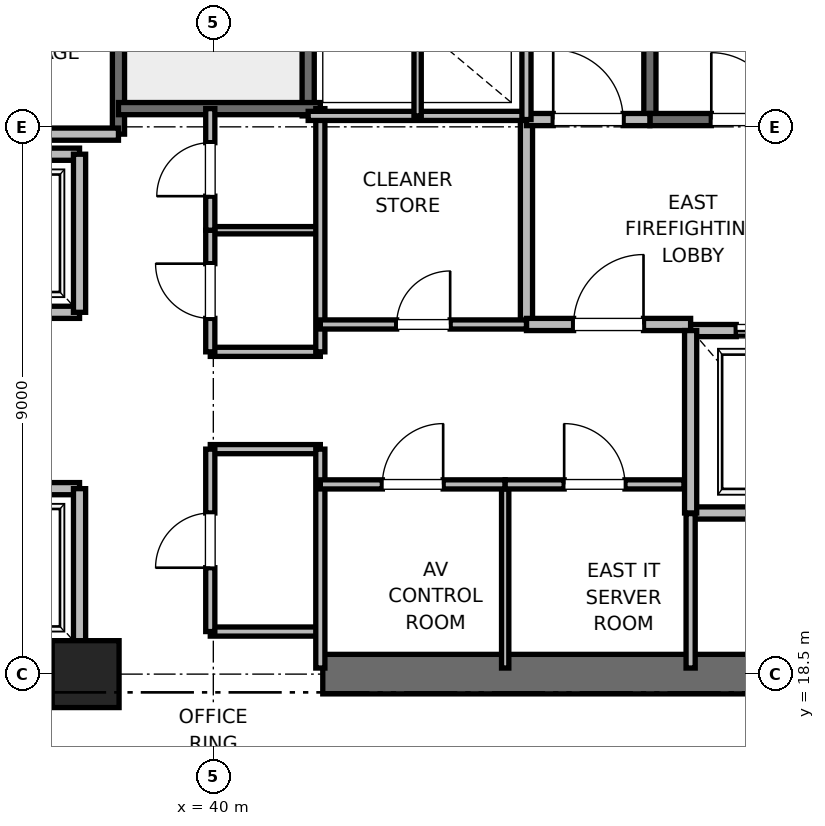
"""IFC4 building model, lengths in metres.
Left out: names, types, materials, properties, quantities, classifications, styles, units other than length and angle.
Written with IfcOpenShell. Run it as: python <this file> out.ifc"""

import sys

from ifc_helpers import new_model, si_unit, direction, frame, frame_2d, origin, origin_2d, place, context, subcontext, project, spatial, rectangle, extrude, element, fill, save


model = new_model("IFC4")
c1 = context("Model", 3, precision=1e-05, world=origin(), true_north=direction((0.0, 1.0)))
c2 = subcontext(c1, "Body", "Model", "MODEL_VIEW")
j1 = project(units=[si_unit("LENGTHUNIT", "METRE"), si_unit("PLANEANGLEUNIT", "RADIAN")], contexts=[c1])
p1 = place(None, origin())
s1 = spatial("IfcSite", under=j1, at=p1, CompositionType="ELEMENT")
p2 = place(p1, origin())
s2 = spatial("IfcBuilding", under=s1, at=p2, CompositionType="ELEMENT")
p3 = place(p2, frame((0.0, 0.0, 59.6)))
s3 = spatial("IfcBuildingStorey", under=s2, at=p3, CompositionType="ELEMENT", Elevation=59.6)
p4 = place(p3, frame((37.9, 18.5, 0.0), z_axis=(0.0, 0.0, 1.0), x_axis=(1.0, 0.0, 0.0)))
e1 = element("IfcColumn", 1, at=p4, inside=s3, PredefinedType="PILASTER", context=c2, shape_type="SweptSolid", body=[
    extrude(rectangle(XDim=1.1, YDim=1.1, at=origin_2d()), origin(), (0.0, 0.0, 1.0), 4.0),
])
for number, where, z_axis, x_axis in (
    (2, (29.0, 18.5, 0.0), (0.0, 0.0, 1.0), (1.0, 0.0, 0.0)),
    (3, (41.8, 18.5, 0.0), (0.0, 0.0, 1.0), (1.0, 0.0, 0.0)),
):
    element("IfcWall", number, at=place(p3, frame(where, z_axis=z_axis, x_axis=x_axis)), inside=s3, PredefinedType="SHEAR", context=c2, shape_type="SweptSolid", body=[
        extrude(rectangle(XDim=9.2, YDim=0.65, at=frame_2d((4.6, 0.0))), origin(), (0.0, 0.0, 1.0), 3.76),
    ])
p5 = place(p3, frame((47.18, 27.62, 0.0), z_axis=(0.0, 0.0, 1.0), x_axis=(0.0, 1.0, 0.0)))
e4 = element("IfcWall", 4, at=p5, inside=s3, PredefinedType="SOLIDWALL", context=c2, shape_type="SweptSolid", body=[
    extrude(rectangle(XDim=8.18, YDim=0.2, at=frame_2d((4.09, 0.0))), origin(), (0.0, 0.0, 1.0), 3.76),
])
p6 = place(p3, frame((47.18, 27.62, 0.0), z_axis=(0.0, 0.0, 1.0), x_axis=(1.0, 0.0, 0.0)))
e5 = element("IfcWall", 5, at=p6, inside=s3, PredefinedType="SOLIDWALL", context=c2, shape_type="SweptSolid", body=[
    extrude(rectangle(XDim=3.12, YDim=0.2, at=frame_2d((1.56, 0.0))), origin(), (0.0, 0.0, 1.0), 3.76),
])
p7 = place(p6, frame((1.01, 0.0, 0.0)))
e6 = element("IfcOpeningElement", 6, at=p7, cuts=e5, PredefinedType="OPENING", context=c2, shape_type="SweptSolid", body=[
    extrude(rectangle(XDim=1.1, YDim=2.15, at=frame_2d((0.55, 1.075))), frame((0.0, 0.1, 0.0), z_axis=(0.0, -1.0, 0.0), x_axis=(1.0, 0.0, 0.0)), (0.0, 0.0, 1.0), 0.2),
])
p8 = place(p3, frame((38.44, 27.38, 0.0), z_axis=(0.0, 0.0, 1.0), x_axis=(0.0, 1.0, 0.0)))
e7 = element("IfcWall", 7, at=p8, inside=s3, PredefinedType="SOLIDWALL", context=c2, shape_type="SweptSolid", body=[
    extrude(rectangle(XDim=8.87, YDim=0.2, at=frame_2d((4.435, 0.0))), origin(), (0.0, 0.0, 1.0), 3.76),
])
p9 = place(p3, frame((41.56, 27.68, 0.0), z_axis=(0.0, 0.0, 1.0), x_axis=(0.0, 1.0, 0.0)))
e8 = element("IfcWall", 8, at=p9, inside=s3, PredefinedType="SOLIDWALL", context=c2, shape_type="SweptSolid", body=[
    extrude(rectangle(XDim=8.57, YDim=0.2, at=frame_2d((4.285, 0.0))), origin(), (0.0, 0.0, 1.0), 3.76),
])
p10 = place(p3, frame((38.44, 27.8, 0.0), z_axis=(0.0, 0.0, 1.0), x_axis=(1.0, 0.0, 0.0)))
e9 = element("IfcWall", 9, at=p10, inside=s3, PredefinedType="SOLIDWALL", context=c2, shape_type="SweptSolid", body=[
    extrude(rectangle(XDim=3.32, YDim=0.2, at=frame_2d((1.66, 0.0))), origin(), (0.0, 0.0, 1.0), 3.76),
])
p11 = place(p3, frame((32.82, 27.38, 0.0), z_axis=(0.0, 0.0, 1.0), x_axis=(1.0, 0.0, 0.0)))
e10 = element("IfcWall", 10, at=p11, inside=s3, PredefinedType="PARTITIONING", context=c2, shape_type="SweptSolid", body=[
    extrude(rectangle(XDim=5.62, YDim=0.2, at=frame_2d((2.81, 0.0))), origin(), (0.0, 0.0, 1.0), 3.76),
])
p12 = place(p3, frame((45.15, 24.25, 0.0), z_axis=(0.0, 0.0, 1.0), x_axis=(0.0, 1.0, 0.0)))
e11 = element("IfcWall", 11, at=p12, inside=s3, PredefinedType="PARTITIONING", context=c2, shape_type="SweptSolid", body=[
    extrude(rectangle(XDim=3.37, YDim=0.2, at=frame_2d((1.685, 0.0))), origin(), (0.0, 0.0, 1.0), 3.76),
])
p13 = place(p3, frame((45.15, 24.25, 0.0), z_axis=(0.0, 0.0, 1.0), x_axis=(1.0, 0.0, 0.0)))
e12 = element("IfcWall", 12, at=p13, inside=s3, PredefinedType="PARTITIONING", context=c2, shape_type="SweptSolid", body=[
    extrude(rectangle(XDim=2.7, YDim=0.2, at=frame_2d((1.35, 0.0))), origin(), (0.0, 0.0, 1.0), 3.76),
])
p14 = place(p13, frame((0.775, 0.0, 0.0)))
e13 = element("IfcOpeningElement", 13, at=p14, cuts=e12, PredefinedType="OPENING", context=c2, shape_type="SweptSolid", body=[
    extrude(rectangle(XDim=1.15, YDim=2.2, at=frame_2d((0.575, 1.1))), frame((0.0, 0.1, 0.0), z_axis=(0.0, -1.0, 0.0), x_axis=(1.0, 0.0, 0.0)), (0.0, 0.0, 1.0), 0.2),
])
p15 = place(p3, frame((45.15, 27.62, 0.0), z_axis=(0.0, 0.0, 1.0), x_axis=(1.0, 0.0, 0.0)))
e14 = element("IfcWall", 14, at=p15, inside=s3, PredefinedType="PARTITIONING", context=c2, shape_type="SweptSolid", body=[
    extrude(rectangle(XDim=2.03, YDim=0.2, at=frame_2d((1.015, 0.0))), origin(), (0.0, 0.0, 1.0), 3.76),
])
p16 = place(p15, frame((0.44, 0.0, 0.0)))
e15 = element("IfcOpeningElement", 15, at=p16, cuts=e14, PredefinedType="OPENING", context=c2, shape_type="SweptSolid", body=[
    extrude(rectangle(XDim=1.15, YDim=2.2, at=frame_2d((0.575, 1.1))), frame((0.0, 0.1, 0.0), z_axis=(0.0, -1.0, 0.0), x_axis=(1.0, 0.0, 0.0)), (0.0, 0.0, 1.0), 0.2),
])
p17 = place(p3, frame((47.85, 21.15, 0.0), z_axis=(0.0, 0.0, 1.0), x_axis=(1.0, 0.0, 0.0)))
e16 = element("IfcWall", 16, at=p17, inside=s3, PredefinedType="SOLIDWALL", context=c2, shape_type="SweptSolid", body=[
    extrude(rectangle(XDim=2.6, YDim=0.2, at=frame_2d((1.3, 0.0))), origin(), (0.0, 0.0, 1.0), 3.76),
])
p18 = place(p3, frame((50.45, 24.15, 0.0), z_axis=(0.0, 0.0, 1.0), x_axis=(-1.0, 0.0, 0.0)))
e17 = element("IfcWall", 17, at=p18, inside=s3, PredefinedType="SOLIDWALL", context=c2, shape_type="SweptSolid", body=[
    extrude(rectangle(XDim=2.6, YDim=0.2, at=frame_2d((1.3, 0.0))), origin(), (0.0, 0.0, 1.0), 2.54),
])
p19 = place(p18, frame((0.75, 0.0, 0.0)))
e18 = element("IfcOpeningElement", 18, at=p19, cuts=e17, PredefinedType="OPENING", context=c2, shape_type="SweptSolid", body=[
    extrude(rectangle(XDim=1.1, YDim=2.2, at=frame_2d((0.55, 1.1))), frame((0.0, 0.1, 0.0), z_axis=(0.0, -1.0, 0.0), x_axis=(1.0, 0.0, 0.0)), (0.0, 0.0, 1.0), 0.2),
])
p20 = place(p3, frame((47.85, 24.15, 0.0), z_axis=(0.0, 0.0, 1.0), x_axis=(0.0, -1.0, 0.0)))
e19 = element("IfcWall", 19, at=p20, inside=s3, PredefinedType="SOLIDWALL", context=c2, shape_type="SweptSolid", body=[
    extrude(rectangle(XDim=3.0, YDim=0.2, at=frame_2d((1.5, 0.0))), origin(), (0.0, 0.0, 1.0), 3.76),
])
p21 = place(p3, frame((35.5, 18.95, 0.0), z_axis=(0.0, 0.0, 1.0), x_axis=(1.0, 0.0, 0.0)))
e20 = element("IfcWall", 20, at=p21, inside=s3, PredefinedType="SOLIDWALL", context=c2, shape_type="SweptSolid", body=[
    extrude(rectangle(XDim=2.3, YDim=0.2, at=frame_2d((1.15, 0.0))), origin(), (0.0, 0.0, 1.0), 2.54),
])
p22 = place(p3, frame((37.8, 21.55, 0.0), z_axis=(0.0, 0.0, 1.0), x_axis=(-1.0, 0.0, 0.0)))
e21 = element("IfcWall", 21, at=p22, inside=s3, PredefinedType="SOLIDWALL", context=c2, shape_type="SweptSolid", body=[
    extrude(rectangle(XDim=2.3, YDim=0.2, at=frame_2d((1.15, 0.0))), origin(), (0.0, 0.0, 1.0), 3.76),
])
p23 = place(p22, frame((0.6, 0.0, 0.0)))
e22 = element("IfcOpeningElement", 22, at=p23, cuts=e21, PredefinedType="OPENING", context=c2, shape_type="SweptSolid", body=[
    extrude(rectangle(XDim=1.1, YDim=2.2, at=frame_2d((0.55, 1.1))), frame((0.0, 0.1, 0.0), z_axis=(0.0, -1.0, 0.0), x_axis=(1.0, 0.0, 0.0)), (0.0, 0.0, 1.0), 0.2),
])
p24 = place(p3, frame((37.8, 18.95, 0.0), z_axis=(0.0, 0.0, 1.0), x_axis=(0.0, 1.0, 0.0)))
e23 = element("IfcWall", 23, at=p24, inside=s3, PredefinedType="SOLIDWALL", context=c2, shape_type="SweptSolid", body=[
    extrude(rectangle(XDim=2.6, YDim=0.2, at=frame_2d((1.3, 0.0))), origin(), (0.0, 0.0, 1.0), 2.54),
])
p25 = place(p3, frame((35.5, 24.45, 0.0), z_axis=(0.0, 0.0, 1.0), x_axis=(1.0, 0.0, 0.0)))
e24 = element("IfcWall", 24, at=p25, inside=s3, PredefinedType="SOLIDWALL", context=c2, shape_type="SweptSolid", body=[
    extrude(rectangle(XDim=2.3, YDim=0.2, at=frame_2d((1.15, 0.0))), origin(), (0.0, 0.0, 1.0), 3.76),
])
p26 = place(p25, frame((0.6, 0.0, 0.0)))
e25 = element("IfcOpeningElement", 25, at=p26, cuts=e24, PredefinedType="OPENING", context=c2, shape_type="SweptSolid", body=[
    extrude(rectangle(XDim=1.1, YDim=2.2, at=frame_2d((0.55, 1.1))), frame((0.0, 0.1, 0.0), z_axis=(0.0, -1.0, 0.0), x_axis=(1.0, 0.0, 0.0)), (0.0, 0.0, 1.0), 0.2),
])
p27 = place(p3, frame((37.8, 27.05, 0.0), z_axis=(0.0, 0.0, 1.0), x_axis=(-1.0, 0.0, 0.0)))
e26 = element("IfcWall", 26, at=p27, inside=s3, PredefinedType="SOLIDWALL", context=c2, shape_type="SweptSolid", body=[
    extrude(rectangle(XDim=2.3, YDim=0.2, at=frame_2d((1.15, 0.0))), origin(), (0.0, 0.0, 1.0), 3.76),
])
p28 = place(p3, frame((37.8, 24.45, 0.0), z_axis=(0.0, 0.0, 1.0), x_axis=(0.0, 1.0, 0.0)))
e27 = element("IfcWall", 27, at=p28, inside=s3, PredefinedType="SOLIDWALL", context=c2, shape_type="SweptSolid", body=[
    extrude(rectangle(XDim=2.6, YDim=0.2, at=frame_2d((1.3, 0.0))), origin(), (0.0, 0.0, 1.0), 3.76),
])
for number, where, z_axis, x_axis in (
    (28, (39.95, 19.2, 0.0), (0.0, 0.0, 1.0), (1.0, 0.0, 0.0)),
    (29, (39.95, 22.2, 0.0), (0.0, 0.0, 1.0), (1.0, 0.0, 0.0)),
    (30, (39.95, 23.8, 0.0), (0.0, 0.0, 1.0), (1.0, 0.0, 0.0)),
):
    element("IfcWall", number, at=place(p3, frame(where, z_axis=z_axis, x_axis=x_axis)), inside=s3, PredefinedType="PARTITIONING", context=c2, shape_type="SweptSolid", body=[
        extrude(rectangle(XDim=1.81, YDim=0.15, at=frame_2d((0.905, 0.0))), origin(), (0.0, 0.0, 1.0), 2.85),
    ])
p29 = place(p3, frame((39.95, 25.8, 0.0), z_axis=(0.0, 0.0, 1.0), x_axis=(1.0, 0.0, 0.0)))
e31 = element("IfcWall", 31, at=p29, inside=s3, PredefinedType="PARTITIONING", context=c2, shape_type="SweptSolid", body=[
    extrude(rectangle(XDim=1.81, YDim=0.12, at=frame_2d((0.905, 0.0))), origin(), (0.0, 0.0, 1.0), 2.85),
])
p30 = place(p3, frame((41.76, 18.6, 0.0), z_axis=(0.0, 0.0, 1.0), x_axis=(0.0, 1.0, 0.0)))
e32 = element("IfcWall", 32, at=p30, inside=s3, PredefinedType="PARTITIONING", context=c2, shape_type="SweptSolid", body=[
    extrude(rectangle(XDim=3.6, YDim=0.15, at=frame_2d((1.8, 0.0))), origin(), (0.0, 0.0, 1.0), 2.54),
])
p31 = place(p3, frame((41.76, 23.8, 0.0), z_axis=(0.0, 0.0, 1.0), x_axis=(0.0, 1.0, 0.0)))
e33 = element("IfcWall", 33, at=p31, inside=s3, PredefinedType="PARTITIONING", context=c2, shape_type="SweptSolid", body=[
    extrude(rectangle(XDim=4.0, YDim=0.15, at=frame_2d((2.0, 0.0))), origin(), (0.0, 0.0, 1.0), 2.85),
])
p32 = place(p3, frame((39.95, 19.2, 0.0), z_axis=(0.0, 0.0, 1.0), x_axis=(0.0, 1.0, 0.0)))
e34 = element("IfcWall", 34, at=p32, inside=s3, PredefinedType="PARTITIONING", context=c2, shape_type="SweptSolid", body=[
    extrude(rectangle(XDim=3.0, YDim=0.15, at=frame_2d((1.5, 0.0))), origin(), (0.0, 0.0, 1.0), 2.85),
])
p33 = place(p32, frame((1.05, 0.0, 0.0)))
e35 = element("IfcOpeningElement", 35, at=p33, cuts=e34, PredefinedType="OPENING", context=c2, shape_type="SweptSolid", body=[
    extrude(rectangle(XDim=0.9, YDim=2.1, at=frame_2d((0.45, 1.05))), frame((0.0, 0.075, 0.0), z_axis=(0.0, -1.0, 0.0), x_axis=(1.0, 0.0, 0.0)), (0.0, 0.0, 1.0), 0.15),
])
p34 = place(p3, frame((39.95, 23.8, 0.0), z_axis=(0.0, 0.0, 1.0), x_axis=(0.0, 1.0, 0.0)))
e36 = element("IfcWall", 36, at=p34, inside=s3, PredefinedType="PARTITIONING", context=c2, shape_type="SweptSolid", body=[
    extrude(rectangle(XDim=2.0, YDim=0.15, at=frame_2d((1.0, 0.0))), origin(), (0.0, 0.0, 1.0), 2.85),
])
p35 = place(p34, frame((0.55, 0.0, 0.0)))
e37 = element("IfcOpeningElement", 37, at=p35, cuts=e36, PredefinedType="OPENING", context=c2, shape_type="SweptSolid", body=[
    extrude(rectangle(XDim=0.9, YDim=2.1, at=frame_2d((0.45, 1.05))), frame((0.0, 0.075, 0.0), z_axis=(0.0, -1.0, 0.0), x_axis=(1.0, 0.0, 0.0)), (0.0, 0.0, 1.0), 0.15),
])
p36 = place(p3, frame((39.95, 25.8, 0.0), z_axis=(0.0, 0.0, 1.0), x_axis=(0.0, 1.0, 0.0)))
e38 = element("IfcWall", 38, at=p36, inside=s3, PredefinedType="PARTITIONING", context=c2, shape_type="SweptSolid", body=[
    extrude(rectangle(XDim=2.0, YDim=0.15, at=frame_2d((1.0, 0.0))), origin(), (0.0, 0.0, 1.0), 2.85),
])
p37 = place(p36, frame((0.56, 0.0, 0.0)))
e39 = element("IfcOpeningElement", 39, at=p37, cuts=e38, PredefinedType="OPENING", context=c2, shape_type="SweptSolid", body=[
    extrude(rectangle(XDim=0.88, YDim=2.1, at=frame_2d((0.44, 1.05))), frame((0.0, 0.075, 0.0), z_axis=(0.0, -1.0, 0.0), x_axis=(1.0, 0.0, 0.0)), (0.0, 0.0, 1.0), 0.15),
])
p38 = place(p3, frame((41.56, 27.68, 0.0), z_axis=(0.0, 0.0, 1.0), x_axis=(1.0, 0.0, 0.0)))
e40 = element("IfcWall", 40, at=p38, inside=s3, PredefinedType="PARTITIONING", context=c2, shape_type="SweptSolid", body=[
    extrude(rectangle(XDim=3.59, YDim=0.15, at=frame_2d((1.795, 0.0))), origin(), (0.0, 0.0, 1.0), 2.85),
])
p39 = place(p3, frame((47.85, 18.6, 0.0), z_axis=(0.0, 0.0, 1.0), x_axis=(0.0, 1.0, 0.0)))
e41 = element("IfcWall", 41, at=p39, inside=s3, PredefinedType="PARTITIONING", context=c2, shape_type="SweptSolid", body=[
    extrude(rectangle(XDim=2.54, YDim=0.15, at=frame_2d((1.27, 0.0))), origin(), (0.0, 0.0, 1.0), 2.85),
])
p40 = place(p3, frame((44.8, 18.6, 0.0), z_axis=(0.0, 0.0, 1.0), x_axis=(0.0, 1.0, 0.0)))
e42 = element("IfcWall", 42, at=p40, inside=s3, PredefinedType="PARTITIONING", context=c2, shape_type="SweptSolid", body=[
    extrude(rectangle(XDim=3.02, YDim=0.12, at=frame_2d((1.51, 0.0))), origin(), (0.0, 0.0, 1.0), 2.85),
])
p41 = place(p3, frame((41.76, 21.62, 0.0), z_axis=(0.0, 0.0, 1.0), x_axis=(1.0, 0.0, 0.0)))
e43 = element("IfcWall", 43, at=p41, inside=s3, PredefinedType="PARTITIONING", context=c2, shape_type="SweptSolid", body=[
    extrude(rectangle(XDim=3.04, YDim=0.15, at=frame_2d((1.52, 0.0))), origin(), (0.0, 0.0, 1.0), 2.85),
])
p42 = place(p41, frame((1.02, 0.0, 0.0)))
e44 = element("IfcOpeningElement", 44, at=p42, cuts=e43, PredefinedType="OPENING", context=c2, shape_type="SweptSolid", body=[
    extrude(rectangle(XDim=1.0, YDim=2.15, at=frame_2d((0.5, 1.075))), frame((0.0, 0.075, 0.0), z_axis=(0.0, -1.0, 0.0), x_axis=(1.0, 0.0, 0.0)), (0.0, 0.0, 1.0), 0.15),
])
p43 = place(p3, frame((44.8, 21.62, 0.0), z_axis=(0.0, 0.0, 1.0), x_axis=(1.0, 0.0, 0.0)))
e45 = element("IfcWall", 45, at=p43, inside=s3, PredefinedType="PARTITIONING", context=c2, shape_type="SweptSolid", body=[
    extrude(rectangle(XDim=2.94, YDim=0.15, at=frame_2d((1.47, 0.0))), origin(), (0.0, 0.0, 1.0), 2.85),
])
p44 = place(p43, frame((0.97, 0.0, 0.0)))
e46 = element("IfcOpeningElement", 46, at=p44, cuts=e45, PredefinedType="OPENING", context=c2, shape_type="SweptSolid", body=[
    extrude(rectangle(XDim=1.0, YDim=2.15, at=frame_2d((0.5, 1.075))), frame((0.0, 0.075, 0.0), z_axis=(0.0, -1.0, 0.0), x_axis=(1.0, 0.0, 0.0)), (0.0, 0.0, 1.0), 0.15),
])
p45 = place(p3, frame((41.76, 24.25, 0.0), z_axis=(0.0, 0.0, 1.0), x_axis=(1.0, 0.0, 0.0)))
e47 = element("IfcWall", 47, at=p45, inside=s3, PredefinedType="PARTITIONING", context=c2, shape_type="SweptSolid", body=[
    extrude(rectangle(XDim=3.39, YDim=0.15, at=frame_2d((1.695, 0.0))), origin(), (0.0, 0.0, 1.0), 2.85),
])
p46 = place(p45, frame((1.255, 0.0, 0.0)))
e48 = element("IfcOpeningElement", 48, at=p46, cuts=e47, PredefinedType="OPENING", context=c2, shape_type="SweptSolid", body=[
    extrude(rectangle(XDim=0.88, YDim=2.1, at=frame_2d((0.44, 1.05))), frame((0.0, 0.075, 0.0), z_axis=(0.0, -1.0, 0.0), x_axis=(1.0, 0.0, 0.0)), (0.0, 0.0, 1.0), 0.15),
])
p47 = place(p3, frame((45.15, 27.62, 0.0), z_axis=(0.0, 0.0, 1.0), x_axis=(0.0, 1.0, 0.0)))
e49 = element("IfcWall", 49, at=p47, inside=s3, PredefinedType="PARTITIONING", context=c2, shape_type="SweptSolid", body=[
    extrude(rectangle(XDim=3.1, YDim=0.15, at=frame_2d((1.55, 0.0))), origin(), (0.0, 0.0, 1.0), 2.85),
])
p48 = place(p3, frame((43.36, 27.68, 0.0), z_axis=(0.0, 0.0, 1.0), x_axis=(0.0, 1.0, 0.0)))
e50 = element("IfcWall", 50, at=p48, inside=s3, PredefinedType="PARTITIONING", context=c2, shape_type="SweptSolid", body=[
    extrude(rectangle(XDim=3.04, YDim=0.12, at=frame_2d((1.52, 0.0))), origin(), (0.0, 0.0, 1.0), 2.85),
])
p49 = place(p7, origin())
e51 = element("IfcDoor", 51, at=p49, inside=s3, OperationType="SINGLE_SWING_LEFT", PredefinedType="DOOR", context=c2, shape_type="SweptSolid", body=[
    extrude(rectangle(XDim=1.1, YDim=2.15, at=frame_2d((0.55, 1.075))), frame((0.0, 0.025, 0.0), z_axis=(0.0, -1.0, 0.0), x_axis=(1.0, 0.0, 0.0)), (0.0, 0.0, 1.0), 0.05),
])
fill(e6, e51)
p50 = place(p14, origin())
e52 = element("IfcDoor", 52, at=p50, inside=s3, OperationType="SINGLE_SWING_RIGHT", PredefinedType="DOOR", context=c2, shape_type="SweptSolid", body=[
    extrude(rectangle(XDim=1.15, YDim=2.2, at=frame_2d((0.575, 1.1))), frame((0.0, 0.025, 0.0), z_axis=(0.0, -1.0, 0.0), x_axis=(1.0, 0.0, 0.0)), (0.0, 0.0, 1.0), 0.05),
])
fill(e13, e52)
p51 = place(p16, origin())
e53 = element("IfcDoor", 53, at=p51, inside=s3, OperationType="SINGLE_SWING_LEFT", PredefinedType="DOOR", context=c2, shape_type="SweptSolid", body=[
    extrude(rectangle(XDim=1.15, YDim=2.2, at=frame_2d((0.575, 1.1))), frame((0.0, 0.025, 0.0), z_axis=(0.0, -1.0, 0.0), x_axis=(1.0, 0.0, 0.0)), (0.0, 0.0, 1.0), 0.05),
])
fill(e15, e53)
p52 = place(p19, origin())
e54 = element("IfcDoor", 54, at=p52, inside=s3, OperationType="SLIDING_TO_RIGHT", PredefinedType="DOOR", context=c2, shape_type="SweptSolid", body=[
    extrude(rectangle(XDim=1.1, YDim=2.2, at=frame_2d((0.55, 1.1))), frame((0.0, 0.025, 0.0), z_axis=(0.0, -1.0, 0.0), x_axis=(1.0, 0.0, 0.0)), (0.0, 0.0, 1.0), 0.05),
])
fill(e18, e54)
p53 = place(p33, origin())
e55 = element("IfcDoor", 55, at=p53, inside=s3, OperationType="SINGLE_SWING_LEFT", PredefinedType="DOOR", context=c2, shape_type="SweptSolid", body=[
    extrude(rectangle(XDim=0.9, YDim=2.1, at=frame_2d((0.45, 1.05))), frame((0.0, 0.025, 0.0), z_axis=(0.0, -1.0, 0.0), x_axis=(1.0, 0.0, 0.0)), (0.0, 0.0, 1.0), 0.05),
])
fill(e35, e55)
p54 = place(p35, origin())
e56 = element("IfcDoor", 56, at=p54, inside=s3, OperationType="SINGLE_SWING_RIGHT", PredefinedType="DOOR", context=c2, shape_type="SweptSolid", body=[
    extrude(rectangle(XDim=0.9, YDim=2.1, at=frame_2d((0.45, 1.05))), frame((0.0, 0.025, 0.0), z_axis=(0.0, -1.0, 0.0), x_axis=(1.0, 0.0, 0.0)), (0.0, 0.0, 1.0), 0.05),
])
fill(e37, e56)
p55 = place(p37, origin())
e57 = element("IfcDoor", 57, at=p55, inside=s3, OperationType="SINGLE_SWING_LEFT", PredefinedType="DOOR", context=c2, shape_type="SweptSolid", body=[
    extrude(rectangle(XDim=0.88, YDim=2.1, at=frame_2d((0.44, 1.05))), frame((0.0, 0.025, 0.0), z_axis=(0.0, -1.0, 0.0), x_axis=(1.0, 0.0, 0.0)), (0.0, 0.0, 1.0), 0.05),
])
fill(e39, e57)
p56 = place(p42, origin())
e58 = element("IfcDoor", 58, at=p56, inside=s3, OperationType="SINGLE_SWING_RIGHT", PredefinedType="DOOR", context=c2, shape_type="SweptSolid", body=[
    extrude(rectangle(XDim=1.0, YDim=2.15, at=frame_2d((0.5, 1.075))), frame((0.0, 0.025, 0.0), z_axis=(0.0, -1.0, 0.0), x_axis=(1.0, 0.0, 0.0)), (0.0, 0.0, 1.0), 0.05),
])
fill(e44, e58)
p57 = place(p44, origin())
e59 = element("IfcDoor", 59, at=p57, inside=s3, OperationType="SINGLE_SWING_LEFT", PredefinedType="DOOR", context=c2, shape_type="SweptSolid", body=[
    extrude(rectangle(XDim=1.0, YDim=2.15, at=frame_2d((0.5, 1.075))), frame((0.0, 0.025, 0.0), z_axis=(0.0, -1.0, 0.0), x_axis=(1.0, 0.0, 0.0)), (0.0, 0.0, 1.0), 0.05),
])
fill(e46, e59)
p58 = place(p46, origin())
e60 = element("IfcDoor", 60, at=p58, inside=s3, OperationType="SINGLE_SWING_RIGHT", PredefinedType="DOOR", context=c2, shape_type="SweptSolid", body=[
    extrude(rectangle(XDim=0.88, YDim=2.1, at=frame_2d((0.44, 1.05))), frame((0.0, 0.025, 0.0), z_axis=(0.0, -1.0, 0.0), x_axis=(1.0, 0.0, 0.0)), (0.0, 0.0, 1.0), 0.05),
])
fill(e48, e60)
save(model, sys.argv[1])
